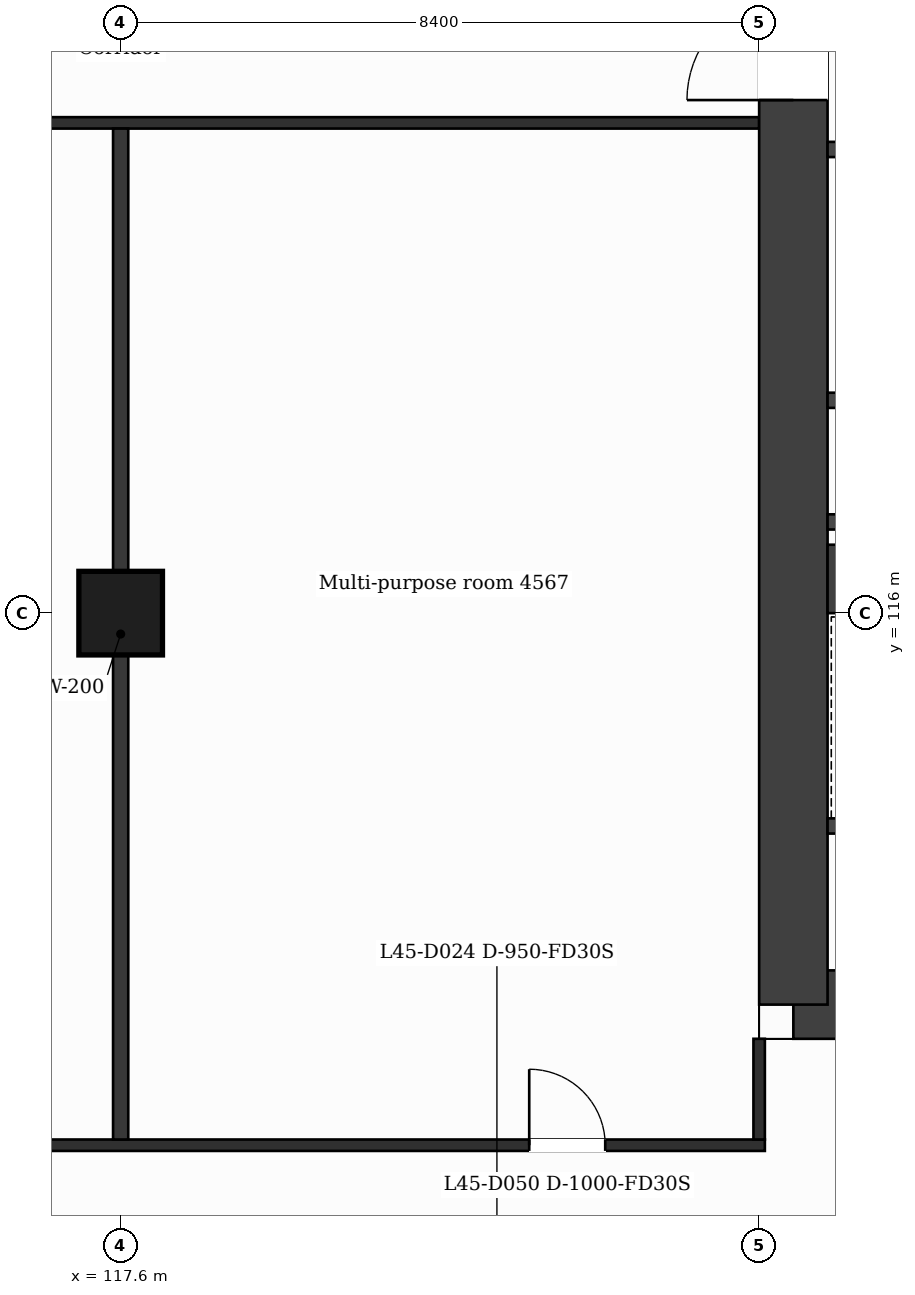
"""IFC4 building model, lengths in metres.
Left out: names, types, materials, properties, quantities, classifications, styles, units other than length and angle.
Written with IfcOpenShell. Run it as: python <this file> out.ifc"""

import sys

from ifc_helpers import new_model, si_unit, direction, frame, frame_2d, origin, origin_2d, place, context, subcontext, project, spatial, rectangle, extrude, element, fill, save


model = new_model("IFC4")
c1 = context("Model", 3, precision=1e-05, world=origin(), true_north=direction((0.0, 1.0)))
c2 = subcontext(c1, "Body", "Model", "MODEL_VIEW")
j1 = project(units=[si_unit("LENGTHUNIT", "METRE"), si_unit("PLANEANGLEUNIT", "RADIAN")], contexts=[c1])
p1 = place(None, origin())
s1 = spatial("IfcSite", under=j1, at=p1, CompositionType="ELEMENT")
p2 = place(p1, origin())
s2 = spatial("IfcBuilding", under=s1, at=p2, CompositionType="ELEMENT")
p3 = place(p2, frame((0.0, 0.0, 188.5)))
s3 = spatial("IfcBuildingStorey", under=s2, at=p3, CompositionType="ELEMENT", Elevation=188.5)
p4 = place(p3, frame((140.616, 110.85, 0.0), z_axis=(0.0, 0.0, 1.0), x_axis=(-1.0, 0.0, 0.0)))
e1 = element("IfcWall", 1, at=p4, inside=s3, PredefinedType="SHEAR", context=c2, shape_type="SweptSolid", body=[
    extrude(rectangle(XDim=14.166, YDim=0.9, at=frame_2d((7.083, 0.0))), origin(), (0.0, 0.0, 1.0), 3.7),
])
p5 = place(p4, frame((6.911, 0.0, 0.0)))
e2 = element("IfcOpeningElement", 2, at=p5, cuts=e1, PredefinedType="OPENING", context=c2, shape_type="SweptSolid", body=[
    extrude(rectangle(XDim=1.4, YDim=2.1, at=frame_2d((0.7, 1.05))), frame((0.0, 0.46, 0.0), z_axis=(0.0, -1.0, 0.0), x_axis=(1.0, 0.0, 0.0)), (0.0, 0.0, 1.0), 0.92),
])
p6 = place(p3, frame((126.45, 110.85, 0.0), z_axis=(0.0, 0.0, 1.0), x_axis=(0.0, 1.0, 0.0)))
e3 = element("IfcWall", 3, at=p6, inside=s3, PredefinedType="SHEAR", context=c2, shape_type="SweptSolid", body=[
    extrude(rectangle(XDim=21.1, YDim=0.9, at=frame_2d((10.55, 0.0))), origin(), (0.0, 0.0, 1.0), 3.7),
])
p7 = place(p6, frame((11.9, 0.0, 0.0)))
e4 = element("IfcOpeningElement", 4, at=p7, cuts=e3, PredefinedType="OPENING", context=c2, shape_type="SweptSolid", body=[
    extrude(rectangle(XDim=1.4, YDim=2.1, at=frame_2d((0.7, 1.05))), frame((0.0, 0.46, 0.0), z_axis=(0.0, -1.0, 0.0), x_axis=(1.0, 0.0, 0.0)), (0.0, 0.0, 1.0), 0.92),
])
p8 = place(p3, frame((126.9, 116.45, 0.0), z_axis=(0.0, 0.0, 1.0), x_axis=(1.0, 0.0, 0.0)))
e5 = element("IfcWall", 5, at=p8, inside=s3, PredefinedType="SHEAR", context=c2, shape_type="SweptSolid", body=[
    extrude(rectangle(XDim=5.1, YDim=0.9, at=frame_2d((2.55, 0.0))), origin(), (0.0, 0.0, 1.0), 3.7),
])
p9 = place(p3, frame((117.6, 116.0, 0.0), z_axis=(0.0, 0.0, 1.0), x_axis=(1.0, 0.0, 0.0)))
e6 = element("IfcColumn", 6, at=p9, inside=s3, PredefinedType="COLUMN", context=c2, shape_type="SweptSolid", body=[
    extrude(rectangle(XDim=1.1, YDim=1.1, at=origin_2d()), origin(), (0.0, 0.0, 1.0), 3.7),
])
p10 = place(p3, frame((100.725, 109.0, 0.0), z_axis=(0.0, 0.0, 1.0), x_axis=(1.0, 0.0, 0.0)))
e7 = element("IfcWall", 7, at=p10, inside=s3, PredefinedType="PARTITIONING", context=c2, shape_type="SweptSolid", body=[
    extrude(rectangle(XDim=25.35, YDim=0.15, at=frame_2d((12.675, 0.0))), origin(), (0.0, 0.0, 1.0), 3.25),
])
p11 = place(p10, frame((1.925, 0.0, 0.0)))
e8 = element("IfcOpeningElement", 8, at=p11, cuts=e7, PredefinedType="OPENING", context=c2, shape_type="SweptSolid", body=[
    extrude(rectangle(XDim=1.0, YDim=2.1, at=frame_2d((0.5, 1.05))), frame((0.0, 0.085, 0.0), z_axis=(0.0, -1.0, 0.0), x_axis=(1.0, 0.0, 0.0)), (0.0, 0.0, 1.0), 0.17),
])
p12 = place(p10, frame((5.875, 0.0, 0.0)))
e9 = element("IfcOpeningElement", 9, at=p12, cuts=e7, PredefinedType="OPENING", context=c2, shape_type="SweptSolid", body=[
    extrude(rectangle(XDim=1.0, YDim=2.1, at=frame_2d((0.5, 1.05))), frame((0.0, 0.085, 0.0), z_axis=(0.0, -1.0, 0.0), x_axis=(1.0, 0.0, 0.0)), (0.0, 0.0, 1.0), 0.17),
])
p13 = place(p10, frame((12.845, 0.0, 0.0)))
e10 = element("IfcOpeningElement", 10, at=p13, cuts=e7, PredefinedType="OPENING", context=c2, shape_type="SweptSolid", body=[
    extrude(rectangle(XDim=1.0, YDim=2.1, at=frame_2d((0.5, 1.05))), frame((0.0, 0.085, 0.0), z_axis=(0.0, -1.0, 0.0), x_axis=(1.0, 0.0, 0.0)), (0.0, 0.0, 1.0), 0.17),
])
p14 = place(p10, frame((22.25, 0.0, 0.0)))
e11 = element("IfcOpeningElement", 11, at=p14, cuts=e7, PredefinedType="OPENING", context=c2, shape_type="SweptSolid", body=[
    extrude(rectangle(XDim=1.0, YDim=2.1, at=frame_2d((0.5, 1.05))), frame((0.0, 0.085, 0.0), z_axis=(0.0, -1.0, 0.0), x_axis=(1.0, 0.0, 0.0)), (0.0, 0.0, 1.0), 0.17),
])
p15 = place(p3, frame((126.9, 113.2, 0.0), z_axis=(0.0, 0.0, 1.0), x_axis=(1.0, 0.0, 0.0)))
e12 = element("IfcWall", 12, at=p15, inside=s3, PredefinedType="PARTITIONING", context=c2, shape_type="SweptSolid", body=[
    extrude(rectangle(XDim=4.773, YDim=0.2, at=frame_2d((2.387, 0.0))), origin(), (0.0, 0.0, 1.0), 3.25),
])
p16 = place(p15, frame((0.484, 0.0, 0.0)))
e13 = element("IfcOpeningElement", 13, at=p16, cuts=e12, PredefinedType="OPENING", context=c2, shape_type="SweptSolid", body=[
    extrude(rectangle(XDim=1.1, YDim=2.1, at=frame_2d((0.55, 1.05))), frame((0.0, 0.11, 0.0), z_axis=(0.0, -1.0, 0.0), x_axis=(1.0, 0.0, 0.0)), (0.0, 0.0, 1.0), 0.22),
])
for number, where, z_axis, x_axis in (
    (14, (126.9, 117.2, 0.0), (0.0, 0.0, 1.0), (1.0, 0.0, 0.0)),
    (15, (126.9, 118.8, 0.0), (0.0, 0.0, 1.0), (1.0, 0.0, 0.0)),
):
    element("IfcWall", number, at=place(p3, frame(where, z_axis=z_axis, x_axis=x_axis)), inside=s3, PredefinedType="PARTITIONING", context=c2, shape_type="SweptSolid", body=[
        extrude(rectangle(XDim=4.673, YDim=0.2, at=frame_2d((2.336, 0.0))), origin(), (0.0, 0.0, 1.0), 3.25),
    ])
p17 = place(p3, frame((126.9, 122.1, 0.0), z_axis=(0.0, 0.0, 1.0), x_axis=(1.0, 0.0, 0.0)))
e16 = element("IfcWall", 16, at=p17, inside=s3, PredefinedType="PARTITIONING", context=c2, shape_type="SweptSolid", body=[
    extrude(rectangle(XDim=4.673, YDim=0.2, at=frame_2d((2.336, 0.0))), origin(), (0.0, 0.0, 1.0), 3.25),
])
p18 = place(p17, frame((1.579, 0.0, 0.0)))
e17 = element("IfcOpeningElement", 17, at=p18, cuts=e16, PredefinedType="OPENING", context=c2, shape_type="SweptSolid", body=[
    extrude(rectangle(XDim=0.9, YDim=2.1, at=frame_2d((0.45, 1.05))), frame((0.0, 0.11, 0.0), z_axis=(0.0, -1.0, 0.0), x_axis=(1.0, 0.0, 0.0)), (0.0, 0.0, 1.0), 0.22),
])
p19 = place(p3, frame((100.8, 122.45, 0.0), z_axis=(0.0, 0.0, 1.0), x_axis=(1.0, 0.0, 0.0)))
e18 = element("IfcWall", 18, at=p19, inside=s3, PredefinedType="PARTITIONING", context=c2, shape_type="SweptSolid", body=[
    extrude(rectangle(XDim=25.2, YDim=0.15, at=frame_2d((12.6, 0.0))), origin(), (0.0, 0.0, 1.0), 3.25),
])
p20 = place(p3, frame((117.6, 109.075, 0.0), z_axis=(0.0, 0.0, 1.0), x_axis=(0.0, 1.0, 0.0)))
e19 = element("IfcWall", 19, at=p20, inside=s3, PredefinedType="PARTITIONING", context=c2, shape_type="SweptSolid", body=[
    extrude(rectangle(XDim=13.3, YDim=0.2, at=frame_2d((6.65, 0.0))), origin(), (0.0, 0.0, 1.0), 3.25),
])
p21 = place(p3, frame((126.0, 109.075, 0.0), z_axis=(0.0, 0.0, 1.0), x_axis=(0.0, 1.0, 0.0)))
e20 = element("IfcWall", 20, at=p21, inside=s3, PredefinedType="PARTITIONING", context=c2, shape_type="SweptSolid", body=[
    extrude(rectangle(XDim=1.325, YDim=0.15, at=frame_2d((0.663, 0.0))), origin(), (0.0, 0.0, 1.0), 3.25),
])
p22 = place(p14, origin())
e21 = element("IfcDoor", 21, at=p22, inside=s3, OperationType="SINGLE_SWING_LEFT", PredefinedType="DOOR", context=c2, shape_type="SweptSolid", body=[
    extrude(rectangle(XDim=1.0, YDim=2.1, at=frame_2d((0.5, 1.05))), frame((0.0, 0.025, 0.0), z_axis=(0.0, -1.0, 0.0), x_axis=(1.0, 0.0, 0.0)), (0.0, 0.0, 1.0), 0.05),
])
fill(e11, e21)
p23 = place(p7, origin())
e22 = element("IfcDoor", 22, at=p23, inside=s3, OperationType="SINGLE_SWING_LEFT", PredefinedType="DOOR", context=c2, shape_type="SweptSolid", body=[
    extrude(rectangle(XDim=1.4, YDim=2.1, at=frame_2d((0.7, 1.05))), frame((0.0, 0.025, 0.0), z_axis=(0.0, -1.0, 0.0), x_axis=(1.0, 0.0, 0.0)), (0.0, 0.0, 1.0), 0.05),
])
fill(e4, e22)
save(model, sys.argv[1])
